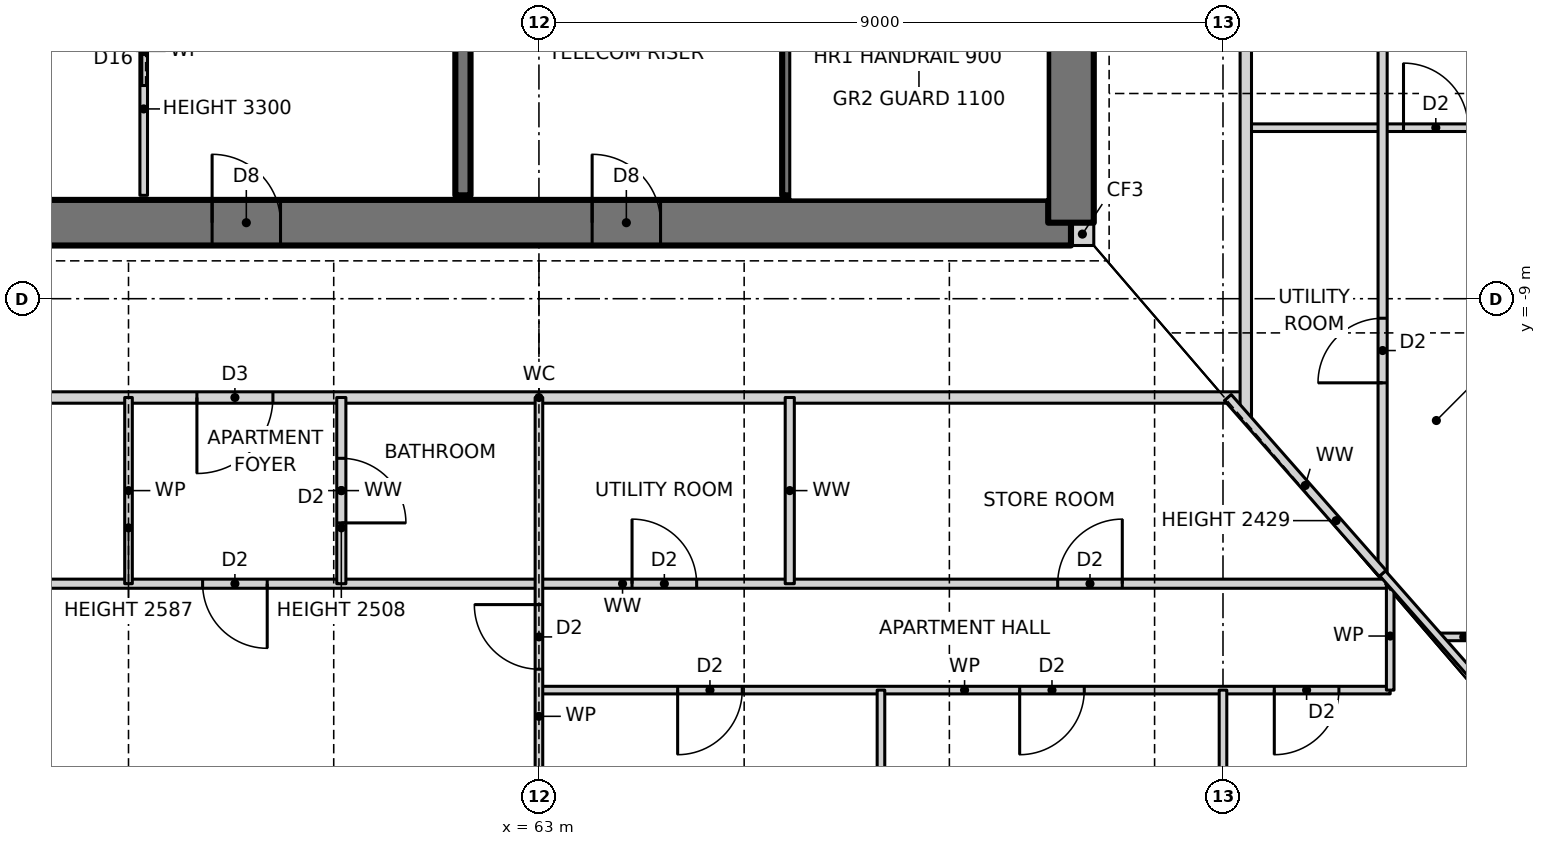
"""IFC4 building model, lengths in metres.
Left out: names, types, materials, properties, quantities, classifications, styles, units other than length and angle.
Written with IfcOpenShell. Run it as: python <this file> out.ifc"""

import sys

from ifc_helpers import new_model, si_unit, direction, frame, frame_2d, origin, place, context, subcontext, project, spatial, rectangle, extrude, element, fill, save


model = new_model("IFC4")
c1 = context("Model", 3, precision=1e-05, world=origin(), true_north=direction((0.0, 1.0)))
c2 = subcontext(c1, "Body", "Model", "MODEL_VIEW")
j1 = project(units=[si_unit("LENGTHUNIT", "METRE"), si_unit("PLANEANGLEUNIT", "RADIAN")], contexts=[c1])
p1 = place(None, origin())
s1 = spatial("IfcSite", under=j1, at=p1, CompositionType="ELEMENT")
p2 = place(p1, origin())
s2 = spatial("IfcBuilding", under=s1, at=p2, CompositionType="ELEMENT")
p3 = place(p2, frame((0.0, 0.0, 39.5)))
s3 = spatial("IfcBuildingStorey", under=s2, at=p3, CompositionType="ELEMENT", Elevation=39.5)
p4 = place(p3, frame((70.0, -8.15, 0.0), z_axis=(0.0, 0.0, 1.0), x_axis=(1.0, 0.0, 0.0)))
e1 = element("IfcWall", 1, at=p4, inside=s3, PredefinedType="SOLIDWALL", context=c2, shape_type="SweptSolid", body=[
    extrude(rectangle(XDim=0.3, YDim=0.3, at=frame_2d((0.15, 0.0))), origin(), (0.0, 0.0, 1.0), 3.5),
])
p5 = place(p3, frame((56.0, -8.0, 0.0), z_axis=(0.0, 0.0, 1.0), x_axis=(1.0, 0.0, 0.0)))
e2 = element("IfcWall", 2, at=p5, inside=s3, PredefinedType="SHEAR", context=c2, shape_type="SweptSolid", body=[
    extrude(rectangle(XDim=14.0, YDim=0.6, at=frame_2d((7.0, 0.0))), origin(), (0.0, 0.0, 1.0), 3.5),
])
p6 = place(p5, frame((2.7, 0.0, 0.0)))
e3 = element("IfcOpeningElement", 3, at=p6, cuts=e2, PredefinedType="OPENING", context=c2, shape_type="SweptSolid", body=[
    extrude(rectangle(XDim=0.9, YDim=2.1, at=frame_2d((0.45, 1.05))), frame((0.0, 0.31, 0.0), z_axis=(0.0, -1.0, 0.0), x_axis=(1.0, 0.0, 0.0)), (0.0, 0.0, 1.0), 0.62),
])
p7 = place(p5, frame((7.7, 0.0, 0.0)))
e4 = element("IfcOpeningElement", 4, at=p7, cuts=e2, PredefinedType="OPENING", context=c2, shape_type="SweptSolid", body=[
    extrude(rectangle(XDim=0.9, YDim=2.1, at=frame_2d((0.45, 1.05))), frame((0.0, 0.31, 0.0), z_axis=(0.0, -1.0, 0.0), x_axis=(1.0, 0.0, 0.0)), (0.0, 0.0, 1.0), 0.62),
])
p8 = place(p3, frame((70.0, -8.0, 0.0), z_axis=(0.0, 0.0, 1.0), x_axis=(0.0, 1.0, 0.0)))
e5 = element("IfcWall", 5, at=p8, inside=s3, PredefinedType="SHEAR", context=c2, shape_type="SweptSolid", body=[
    extrude(rectangle(XDim=16.0, YDim=0.6, at=frame_2d((8.0, 0.0))), origin(), (0.0, 0.0, 1.0), 3.5),
])
p9 = place(p8, frame((7.5, 0.0, 0.0)))
e6 = element("IfcOpeningElement", 6, at=p9, cuts=e5, PredefinedType="OPENING", context=c2, shape_type="SweptSolid", body=[
    extrude(rectangle(XDim=1.0, YDim=2.1, at=frame_2d((0.5, 1.05))), frame((0.0, 0.31, 0.0), z_axis=(0.0, -1.0, 0.0), x_axis=(1.0, 0.0, 0.0)), (0.0, 0.0, 1.0), 0.62),
])
p10 = place(p3, frame((63.0, -14.15, 0.0), z_axis=(0.0, 0.0, 1.0), x_axis=(1.0, 0.0, 0.0)))
e7 = element("IfcWall", 7, at=p10, inside=s3, PredefinedType="PARTITIONING", context=c2, shape_type="SweptSolid", body=[
    extrude(rectangle(XDim=11.2, YDim=0.1, at=frame_2d((5.6, 0.0))), origin(), (0.0, 0.0, 1.0), 3.27),
])
p11 = place(p10, frame((1.825, 0.0, 0.0)))
e8 = element("IfcOpeningElement", 8, at=p11, cuts=e7, PredefinedType="OPENING", context=c2, shape_type="SweptSolid", body=[
    extrude(rectangle(XDim=0.85, YDim=2.1, at=frame_2d((0.425, 1.05))), frame((0.0, 0.06, 0.0), z_axis=(0.0, -1.0, 0.0), x_axis=(1.0, 0.0, 0.0)), (0.0, 0.0, 1.0), 0.12),
])
p12 = place(p10, frame((6.325, 0.0, 0.0)))
e9 = element("IfcOpeningElement", 9, at=p12, cuts=e7, PredefinedType="OPENING", context=c2, shape_type="SweptSolid", body=[
    extrude(rectangle(XDim=0.85, YDim=2.1, at=frame_2d((0.425, 1.05))), frame((0.0, 0.06, 0.0), z_axis=(0.0, -1.0, 0.0), x_axis=(1.0, 0.0, 0.0)), (0.0, 0.0, 1.0), 0.12),
])
p13 = place(p10, frame((9.675, 0.0, 0.0)))
e10 = element("IfcOpeningElement", 10, at=p13, cuts=e7, PredefinedType="OPENING", context=c2, shape_type="SweptSolid", body=[
    extrude(rectangle(XDim=0.85, YDim=2.1, at=frame_2d((0.425, 1.05))), frame((0.0, 0.06, 0.0), z_axis=(0.0, -1.0, 0.0), x_axis=(1.0, 0.0, 0.0)), (0.0, 0.0, 1.0), 0.12),
])
p14 = place(p3, frame((74.836, -13.45, 0.0), z_axis=(0.0, 0.0, 1.0), x_axis=(1.0, 0.0, 0.0)))
e11 = element("IfcWall", 11, at=p14, inside=s3, PredefinedType="PARTITIONING", context=c2, shape_type="SweptSolid", body=[
    extrude(rectangle(XDim=0.664, YDim=0.1, at=frame_2d((0.332, 0.0))), origin(), (0.0, 0.0, 1.0), 3.27),
])
p15 = place(p3, frame((54.0, -12.75, 0.0), z_axis=(0.0, 0.0, 1.0), x_axis=(1.0, 0.0, 0.0)))
e12 = element("IfcWall", 12, at=p15, inside=s3, PredefinedType="PARTITIONING", context=c2, shape_type="SweptSolid", body=[
    extrude(rectangle(XDim=20.2, YDim=0.12, at=frame_2d((10.1, 0.0))), origin(), (0.0, 0.0, 1.0), 3.27),
])
p16 = place(p15, frame((1.375, 0.0, 0.0)))
e13 = element("IfcOpeningElement", 13, at=p16, cuts=e12, PredefinedType="OPENING", context=c2, shape_type="SweptSolid", body=[
    extrude(rectangle(XDim=0.85, YDim=2.1, at=frame_2d((0.425, 1.05))), frame((0.0, 0.07, 0.0), z_axis=(0.0, -1.0, 0.0), x_axis=(1.0, 0.0, 0.0)), (0.0, 0.0, 1.0), 0.14),
])
p17 = place(p15, frame((4.575, 0.0, 0.0)))
e14 = element("IfcOpeningElement", 14, at=p17, cuts=e12, PredefinedType="OPENING", context=c2, shape_type="SweptSolid", body=[
    extrude(rectangle(XDim=0.85, YDim=2.1, at=frame_2d((0.425, 1.05))), frame((0.0, 0.07, 0.0), z_axis=(0.0, -1.0, 0.0), x_axis=(1.0, 0.0, 0.0)), (0.0, 0.0, 1.0), 0.14),
])
p18 = place(p15, frame((10.225, 0.0, 0.0)))
e15 = element("IfcOpeningElement", 15, at=p18, cuts=e12, PredefinedType="OPENING", context=c2, shape_type="SweptSolid", body=[
    extrude(rectangle(XDim=0.85, YDim=2.1, at=frame_2d((0.425, 1.05))), frame((0.0, 0.07, 0.0), z_axis=(0.0, -1.0, 0.0), x_axis=(1.0, 0.0, 0.0)), (0.0, 0.0, 1.0), 0.14),
])
p19 = place(p15, frame((15.825, 0.0, 0.0)))
e16 = element("IfcOpeningElement", 16, at=p19, cuts=e12, PredefinedType="OPENING", context=c2, shape_type="SweptSolid", body=[
    extrude(rectangle(XDim=0.85, YDim=2.1, at=frame_2d((0.425, 1.05))), frame((0.0, 0.07, 0.0), z_axis=(0.0, -1.0, 0.0), x_axis=(1.0, 0.0, 0.0)), (0.0, 0.0, 1.0), 0.14),
])
p20 = place(p3, frame((53.7, -10.3, 0.0), z_axis=(0.0, 0.0, 1.0), x_axis=(1.0, 0.0, 0.0)))
e17 = element("IfcWall", 17, at=p20, inside=s3, PredefinedType="PARTITIONING", context=c2, shape_type="SweptSolid", body=[
    extrude(rectangle(XDim=18.6, YDim=0.15, at=frame_2d((9.3, 0.0))), origin(), (0.0, 0.0, 1.0), 3.27),
])
p21 = place(p20, frame((4.8, 0.0, 0.0)))
e18 = element("IfcOpeningElement", 18, at=p21, cuts=e17, PredefinedType="OPENING", context=c2, shape_type="SweptSolid", body=[
    extrude(rectangle(XDim=1.0, YDim=2.1, at=frame_2d((0.5, 1.05))), frame((0.0, 0.085, 0.0), z_axis=(0.0, -1.0, 0.0), x_axis=(1.0, 0.0, 0.0)), (0.0, 0.0, 1.0), 0.17),
])
p22 = place(p3, frame((72.3, -6.75, 0.0), z_axis=(0.0, 0.0, 1.0), x_axis=(1.0, 0.0, 0.0)))
e19 = element("IfcWall", 19, at=p22, inside=s3, PredefinedType="PARTITIONING", context=c2, shape_type="SweptSolid", body=[
    extrude(rectangle(XDim=7.14, YDim=0.1, at=frame_2d((3.57, 0.0))), origin(), (0.0, 0.0, 1.0), 3.27),
])
p23 = place(p22, frame((2.075, 0.0, 0.0)))
e20 = element("IfcOpeningElement", 20, at=p23, cuts=e19, PredefinedType="OPENING", context=c2, shape_type="SweptSolid", body=[
    extrude(rectangle(XDim=0.85, YDim=2.1, at=frame_2d((0.425, 1.05))), frame((0.0, 0.06, 0.0), z_axis=(0.0, -1.0, 0.0), x_axis=(1.0, 0.0, 0.0)), (0.0, 0.0, 1.0), 0.12),
])
p24 = place(p3, frame((74.2, -14.15, 0.0), z_axis=(0.0, 0.0, 1.0), x_axis=(0.0, 1.0, 0.0)))
e21 = element("IfcWall", 21, at=p24, inside=s3, PredefinedType="PARTITIONING", context=c2, shape_type="SweptSolid", body=[
    extrude(rectangle(XDim=1.423, YDim=0.1, at=frame_2d((0.711, 0.0))), origin(), (0.0, 0.0, 1.0), 3.27),
])
p25 = place(p3, frame((74.1, -12.614, 0.0), z_axis=(0.0, 0.0, 1.0), x_axis=(0.0, 1.0, 0.0)))
e22 = element("IfcWall", 22, at=p25, inside=s3, PredefinedType="PARTITIONING", context=c2, shape_type="SweptSolid", body=[
    extrude(rectangle(XDim=25.228, YDim=0.12, at=frame_2d((12.614, 0.0))), origin(), (0.0, 0.0, 1.0), 3.27),
])
p26 = place(p25, frame((7.239, 0.0, 0.0)))
e23 = element("IfcOpeningElement", 23, at=p26, cuts=e22, PredefinedType="OPENING", context=c2, shape_type="SweptSolid", body=[
    extrude(rectangle(XDim=0.85, YDim=2.1, at=frame_2d((0.425, 1.05))), frame((0.0, 0.07, 0.0), z_axis=(0.0, -1.0, 0.0), x_axis=(1.0, 0.0, 0.0)), (0.0, 0.0, 1.0), 0.14),
])
p27 = place(p25, frame((10.439, 0.0, 0.0)))
e24 = element("IfcOpeningElement", 24, at=p27, cuts=e22, PredefinedType="OPENING", context=c2, shape_type="SweptSolid", body=[
    extrude(rectangle(XDim=0.85, YDim=2.1, at=frame_2d((0.425, 1.05))), frame((0.0, 0.07, 0.0), z_axis=(0.0, -1.0, 0.0), x_axis=(1.0, 0.0, 0.0)), (0.0, 0.0, 1.0), 0.14),
])
p28 = place(p25, frame((2.507, 0.0, 0.0)))
e25 = element("IfcOpeningElement", 25, at=p28, cuts=e22, PredefinedType="OPENING", context=c2, shape_type="SweptSolid", body=[
    extrude(rectangle(XDim=0.85, YDim=2.1, at=frame_2d((0.425, 1.05))), frame((0.0, 0.07, 0.0), z_axis=(0.0, -1.0, 0.0), x_axis=(1.0, 0.0, 0.0)), (0.0, 0.0, 1.0), 0.14),
])
p29 = place(p25, frame((16.639, 0.0, 0.0)))
e26 = element("IfcOpeningElement", 26, at=p29, cuts=e22, PredefinedType="OPENING", context=c2, shape_type="SweptSolid", body=[
    extrude(rectangle(XDim=0.85, YDim=2.1, at=frame_2d((0.425, 1.05))), frame((0.0, 0.07, 0.0), z_axis=(0.0, -1.0, 0.0), x_axis=(1.0, 0.0, 0.0)), (0.0, 0.0, 1.0), 0.14),
])
p30 = place(p25, frame((21.821, 0.0, 0.0)))
e27 = element("IfcOpeningElement", 27, at=p30, cuts=e22, PredefinedType="OPENING", context=c2, shape_type="SweptSolid", body=[
    extrude(rectangle(XDim=0.85, YDim=2.1, at=frame_2d((0.425, 1.05))), frame((0.0, 0.07, 0.0), z_axis=(0.0, -1.0, 0.0), x_axis=(1.0, 0.0, 0.0)), (0.0, 0.0, 1.0), 0.14),
])
p31 = place(p3, frame((72.3, -10.568, 0.0), z_axis=(0.0, 0.0, 1.0), x_axis=(0.0, 1.0, 0.0)))
e28 = element("IfcWall", 28, at=p31, inside=s3, PredefinedType="PARTITIONING", context=c2, shape_type="SweptSolid", body=[
    extrude(rectangle(XDim=21.468, YDim=0.15, at=frame_2d((10.734, 0.0))), origin(), (0.0, 0.0, 1.0), 3.27),
])
p32 = place(p31, frame((8.318, 0.0, 0.0)))
e29 = element("IfcOpeningElement", 29, at=p32, cuts=e28, PredefinedType="OPENING", context=c2, shape_type="SweptSolid", body=[
    extrude(rectangle(XDim=1.0, YDim=2.1, at=frame_2d((0.5, 1.05))), frame((0.0, 0.085, 0.0), z_axis=(0.0, -1.0, 0.0), x_axis=(1.0, 0.0, 0.0)), (0.0, 0.0, 1.0), 0.17),
])
for number, where, z_axis, x_axis in (
    (30, (72.0, -18.69, 0.0), (0.0, 0.0, 1.0), (0.0, 1.0, 0.0)),
    (31, (67.5, -18.69, 0.0), (0.0, 0.0, 1.0), (0.0, 1.0, 0.0)),
):
    element("IfcWall", number, at=place(p3, frame(where, z_axis=z_axis, x_axis=x_axis)), inside=s3, PredefinedType="PARTITIONING", context=c2, shape_type="SweptSolid", body=[
        extrude(rectangle(XDim=4.54, YDim=0.1, at=frame_2d((2.27, 0.0))), origin(), (0.0, 0.0, 1.0), 3.27),
    ])
p33 = place(p3, frame((66.3, -12.75, 0.0), z_axis=(0.0, 0.0, 1.0), x_axis=(0.0, 1.0, 0.0)))
e32 = element("IfcWall", 32, at=p33, inside=s3, PredefinedType="PARTITIONING", context=c2, shape_type="SweptSolid", body=[
    extrude(rectangle(XDim=2.45, YDim=0.12, at=frame_2d((1.225, 0.0))), origin(), (0.0, 0.0, 1.0), 3.27),
])
p34 = place(p3, frame((66.3, -7.64, 0.0), z_axis=(0.0, 0.0, 1.0), x_axis=(0.0, 1.0, 0.0)))
e33 = element("IfcWall", 33, at=p34, inside=s3, PredefinedType="SOLIDWALL", context=c2, shape_type="SweptSolid", body=[
    extrude(rectangle(XDim=11.49, YDim=0.2, at=frame_2d((5.745, 0.0))), origin(), (0.0, 0.0, 1.0), 3.5),
])
p35 = place(p34, frame((7.04, 0.0, 0.0)))
e34 = element("IfcOpeningElement", 34, at=p35, cuts=e33, PredefinedType="OPENING", context=c2, shape_type="SweptSolid", body=[
    extrude(rectangle(XDim=1.2, YDim=2.1, at=frame_2d((0.6, 1.05))), frame((0.0, 0.11, 0.0), z_axis=(0.0, -1.0, 0.0), x_axis=(1.0, 0.0, 0.0)), (0.0, 0.0, 1.0), 0.22),
])
p36 = place(p3, frame((63.0, -18.69, 0.0), z_axis=(0.0, 0.0, 1.0), x_axis=(0.0, 1.0, 0.0)))
e35 = element("IfcWall", 35, at=p36, inside=s3, PredefinedType="PARTITIONING", context=c2, shape_type="SweptSolid", body=[
    extrude(rectangle(XDim=8.39, YDim=0.1, at=frame_2d((4.195, 0.0))), origin(), (0.0, 0.0, 1.0), 2.587),
])
p37 = place(p36, frame((4.815, 0.0, 0.0)))
e36 = element("IfcOpeningElement", 36, at=p37, cuts=e35, PredefinedType="OPENING", context=c2, shape_type="SweptSolid", body=[
    extrude(rectangle(XDim=0.85, YDim=2.1, at=frame_2d((0.425, 1.05))), frame((0.0, 0.06, 0.0), z_axis=(0.0, -1.0, 0.0), x_axis=(1.0, 0.0, 0.0)), (0.0, 0.0, 1.0), 0.12),
])
p38 = place(p3, frame((62.0, -7.64, 0.0), z_axis=(0.0, 0.0, 1.0), x_axis=(0.0, 1.0, 0.0)))
e37 = element("IfcWall", 37, at=p38, inside=s3, PredefinedType="SOLIDWALL", context=c2, shape_type="SweptSolid", body=[
    extrude(rectangle(XDim=3.79, YDim=0.2, at=frame_2d((1.895, 0.0))), origin(), (0.0, 0.0, 1.0), 3.5),
])
p39 = place(p3, frame((60.4, -12.75, 0.0), z_axis=(0.0, 0.0, 1.0), x_axis=(0.0, 1.0, 0.0)))
e38 = element("IfcWall", 38, at=p39, inside=s3, PredefinedType="PARTITIONING", context=c2, shape_type="SweptSolid", body=[
    extrude(rectangle(XDim=2.45, YDim=0.12, at=frame_2d((1.225, 0.0))), origin(), (0.0, 0.0, 1.0), 2.508),
])
p40 = place(p39, frame((0.8, 0.0, 0.0)))
e39 = element("IfcOpeningElement", 39, at=p40, cuts=e38, PredefinedType="OPENING", context=c2, shape_type="SweptSolid", body=[
    extrude(rectangle(XDim=0.85, YDim=2.1, at=frame_2d((0.425, 1.05))), frame((0.0, 0.07, 0.0), z_axis=(0.0, -1.0, 0.0), x_axis=(1.0, 0.0, 0.0)), (0.0, 0.0, 1.0), 0.14),
])
p41 = place(p3, frame((57.8, -7.64, 0.0), z_axis=(0.0, 0.0, 1.0), x_axis=(0.0, 1.0, 0.0)))
e40 = element("IfcWall", 40, at=p41, inside=s3, PredefinedType="PARTITIONING", context=c2, shape_type="SweptSolid", body=[
    extrude(rectangle(XDim=3.79, YDim=0.1, at=frame_2d((1.895, 0.0))), origin(), (0.0, 0.0, 1.0), 3.3),
])
p42 = place(p41, frame((1.445, 0.0, 0.0)))
e41 = element("IfcOpeningElement", 41, at=p42, cuts=e40, PredefinedType="OPENING", context=c2, shape_type="SweptSolid", body=[
    extrude(rectangle(XDim=0.9, YDim=2.1, at=frame_2d((0.45, 1.05))), frame((0.0, 0.06, 0.0), z_axis=(0.0, -1.0, 0.0), x_axis=(1.0, 0.0, 0.0)), (0.0, 0.0, 1.0), 0.12),
])
p43 = place(p3, frame((57.6, -12.75, 0.0), z_axis=(0.0, 0.0, 1.0), x_axis=(0.0, 1.0, 0.0)))
e42 = element("IfcWall", 42, at=p43, inside=s3, PredefinedType="PARTITIONING", context=c2, shape_type="SweptSolid", body=[
    extrude(rectangle(XDim=2.45, YDim=0.1, at=frame_2d((1.225, 0.0))), origin(), (0.0, 0.0, 1.0), 2.587),
])
p44 = place(p3, frame((78.057, -17.109, 0.0), z_axis=(0.0, 0.0, 1.0), x_axis=(-0.660775837956, 0.750583301156, 0.0)))
e43 = element("IfcWall", 43, at=p44, inside=s3, PredefinedType="PARTITIONING", context=c2, shape_type="SweptSolid", body=[
    extrude(rectangle(XDim=5.989, YDim=0.1, at=frame_2d((2.994, 0.0))), origin(), (0.0, 0.0, 1.0), 2.429),
])
p45 = place(p3, frame((74.1, -12.614, 0.0), z_axis=(0.0, 0.0, 1.0), x_axis=(-0.660767161141, 0.750590939699, 0.0)))
e44 = element("IfcWall", 44, at=p45, inside=s3, PredefinedType="PARTITIONING", context=c2, shape_type="SweptSolid", body=[
    extrude(rectangle(XDim=3.082, YDim=0.12, at=frame_2d((1.541, 0.0))), origin(), (0.0, 0.0, 1.0), 2.429),
])
p46 = place(p42, origin())
e45 = element("IfcDoor", 45, at=p46, inside=s3, OperationType="SLIDING_TO_LEFT", PredefinedType="DOOR", context=c2, shape_type="SweptSolid", body=[
    extrude(rectangle(XDim=0.9, YDim=2.1, at=frame_2d((0.45, 1.05))), frame((0.0, 0.025, 0.0), z_axis=(0.0, -1.0, 0.0), x_axis=(1.0, 0.0, 0.0)), (0.0, 0.0, 1.0), 0.05),
])
fill(e41, e45)
p47 = place(p21, frame((1.0, 0.0, 0.0), z_axis=(0.0, 0.0, 1.0), x_axis=(-1.0, 0.0, 0.0)))
e46 = element("IfcDoor", 46, at=p47, inside=s3, OperationType="SINGLE_SWING_RIGHT", PredefinedType="DOOR", context=c2, shape_type="SweptSolid", body=[
    extrude(rectangle(XDim=1.0, YDim=2.1, at=frame_2d((0.5, 1.05))), frame((0.0, 0.025, 0.0), z_axis=(0.0, -1.0, 0.0), x_axis=(1.0, 0.0, 0.0)), (0.0, 0.0, 1.0), 0.05),
])
fill(e18, e46)
p48 = place(p17, frame((0.85, 0.0, 0.0), z_axis=(0.0, 0.0, 1.0), x_axis=(-1.0, 0.0, 0.0)))
e47 = element("IfcDoor", 47, at=p48, inside=s3, OperationType="SINGLE_SWING_LEFT", PredefinedType="DOOR", context=c2, shape_type="SweptSolid", body=[
    extrude(rectangle(XDim=0.85, YDim=2.1, at=frame_2d((0.425, 1.05))), frame((0.0, 0.025, 0.0), z_axis=(0.0, -1.0, 0.0), x_axis=(1.0, 0.0, 0.0)), (0.0, 0.0, 1.0), 0.05),
])
fill(e14, e47)
p49 = place(p40, frame((0.85, 0.0, 0.0), z_axis=(0.0, 0.0, 1.0), x_axis=(-1.0, 0.0, 0.0)))
e48 = element("IfcDoor", 48, at=p49, inside=s3, OperationType="SINGLE_SWING_RIGHT", PredefinedType="DOOR", context=c2, shape_type="SweptSolid", body=[
    extrude(rectangle(XDim=0.85, YDim=2.1, at=frame_2d((0.425, 1.05))), frame((0.0, 0.025, 0.0), z_axis=(0.0, -1.0, 0.0), x_axis=(1.0, 0.0, 0.0)), (0.0, 0.0, 1.0), 0.05),
])
fill(e39, e48)
p50 = place(p37, origin())
e49 = element("IfcDoor", 49, at=p50, inside=s3, OperationType="SINGLE_SWING_RIGHT", PredefinedType="DOOR", context=c2, shape_type="SweptSolid", body=[
    extrude(rectangle(XDim=0.85, YDim=2.1, at=frame_2d((0.425, 1.05))), frame((0.0, 0.025, 0.0), z_axis=(0.0, -1.0, 0.0), x_axis=(1.0, 0.0, 0.0)), (0.0, 0.0, 1.0), 0.05),
])
fill(e36, e49)
p51 = place(p11, frame((0.85, 0.0, 0.0), z_axis=(0.0, 0.0, 1.0), x_axis=(-1.0, 0.0, 0.0)))
e50 = element("IfcDoor", 50, at=p51, inside=s3, OperationType="SINGLE_SWING_RIGHT", PredefinedType="DOOR", context=c2, shape_type="SweptSolid", body=[
    extrude(rectangle(XDim=0.85, YDim=2.1, at=frame_2d((0.425, 1.05))), frame((0.0, 0.025, 0.0), z_axis=(0.0, -1.0, 0.0), x_axis=(1.0, 0.0, 0.0)), (0.0, 0.0, 1.0), 0.05),
])
fill(e8, e50)
p52 = place(p12, frame((0.85, 0.0, 0.0), z_axis=(0.0, 0.0, 1.0), x_axis=(-1.0, 0.0, 0.0)))
e51 = element("IfcDoor", 51, at=p52, inside=s3, OperationType="SINGLE_SWING_RIGHT", PredefinedType="DOOR", context=c2, shape_type="SweptSolid", body=[
    extrude(rectangle(XDim=0.85, YDim=2.1, at=frame_2d((0.425, 1.05))), frame((0.0, 0.025, 0.0), z_axis=(0.0, -1.0, 0.0), x_axis=(1.0, 0.0, 0.0)), (0.0, 0.0, 1.0), 0.05),
])
fill(e9, e51)
p53 = place(p13, frame((0.85, 0.0, 0.0), z_axis=(0.0, 0.0, 1.0), x_axis=(-1.0, 0.0, 0.0)))
e52 = element("IfcDoor", 52, at=p53, inside=s3, OperationType="SINGLE_SWING_RIGHT", PredefinedType="DOOR", context=c2, shape_type="SweptSolid", body=[
    extrude(rectangle(XDim=0.85, YDim=2.1, at=frame_2d((0.425, 1.05))), frame((0.0, 0.025, 0.0), z_axis=(0.0, -1.0, 0.0), x_axis=(1.0, 0.0, 0.0)), (0.0, 0.0, 1.0), 0.05),
])
fill(e10, e52)
p54 = place(p18, origin())
e53 = element("IfcDoor", 53, at=p54, inside=s3, OperationType="SINGLE_SWING_LEFT", PredefinedType="DOOR", context=c2, shape_type="SweptSolid", body=[
    extrude(rectangle(XDim=0.85, YDim=2.1, at=frame_2d((0.425, 1.05))), frame((0.0, 0.025, 0.0), z_axis=(0.0, -1.0, 0.0), x_axis=(1.0, 0.0, 0.0)), (0.0, 0.0, 1.0), 0.05),
])
fill(e15, e53)
p55 = place(p19, origin())
e54 = element("IfcDoor", 54, at=p55, inside=s3, OperationType="SINGLE_SWING_RIGHT", PredefinedType="DOOR", context=c2, shape_type="SweptSolid", body=[
    extrude(rectangle(XDim=0.85, YDim=2.1, at=frame_2d((0.425, 1.05))), frame((0.0, 0.025, 0.0), z_axis=(0.0, -1.0, 0.0), x_axis=(1.0, 0.0, 0.0)), (0.0, 0.0, 1.0), 0.05),
])
fill(e16, e54)
p56 = place(p23, origin())
e55 = element("IfcDoor", 55, at=p56, inside=s3, OperationType="SINGLE_SWING_LEFT", PredefinedType="DOOR", context=c2, shape_type="SweptSolid", body=[
    extrude(rectangle(XDim=0.85, YDim=2.1, at=frame_2d((0.425, 1.05))), frame((0.0, 0.025, 0.0), z_axis=(0.0, -1.0, 0.0), x_axis=(1.0, 0.0, 0.0)), (0.0, 0.0, 1.0), 0.05),
])
fill(e20, e55)
p57 = place(p28, origin())
e56 = element("IfcDoor", 56, at=p57, inside=s3, OperationType="SINGLE_SWING_LEFT", PredefinedType="DOOR", context=c2, shape_type="SweptSolid", body=[
    extrude(rectangle(XDim=0.85, YDim=2.1, at=frame_2d((0.425, 1.05))), frame((0.0, 0.025, 0.0), z_axis=(0.0, -1.0, 0.0), x_axis=(1.0, 0.0, 0.0)), (0.0, 0.0, 1.0), 0.05),
])
fill(e25, e56)
p58 = place(p6, origin())
e57 = element("IfcDoor", 57, at=p58, inside=s3, OperationType="SINGLE_SWING_LEFT", PredefinedType="DOOR", context=c2, shape_type="SweptSolid", body=[
    extrude(rectangle(XDim=0.9, YDim=2.1, at=frame_2d((0.45, 1.05))), frame((0.0, 0.025, 0.0), z_axis=(0.0, -1.0, 0.0), x_axis=(1.0, 0.0, 0.0)), (0.0, 0.0, 1.0), 0.05),
])
fill(e3, e57)
p59 = place(p7, origin())
e58 = element("IfcDoor", 58, at=p59, inside=s3, OperationType="SINGLE_SWING_LEFT", PredefinedType="DOOR", context=c2, shape_type="SweptSolid", body=[
    extrude(rectangle(XDim=0.9, YDim=2.1, at=frame_2d((0.45, 1.05))), frame((0.0, 0.025, 0.0), z_axis=(0.0, -1.0, 0.0), x_axis=(1.0, 0.0, 0.0)), (0.0, 0.0, 1.0), 0.05),
])
fill(e4, e58)
save(model, sys.argv[1])
